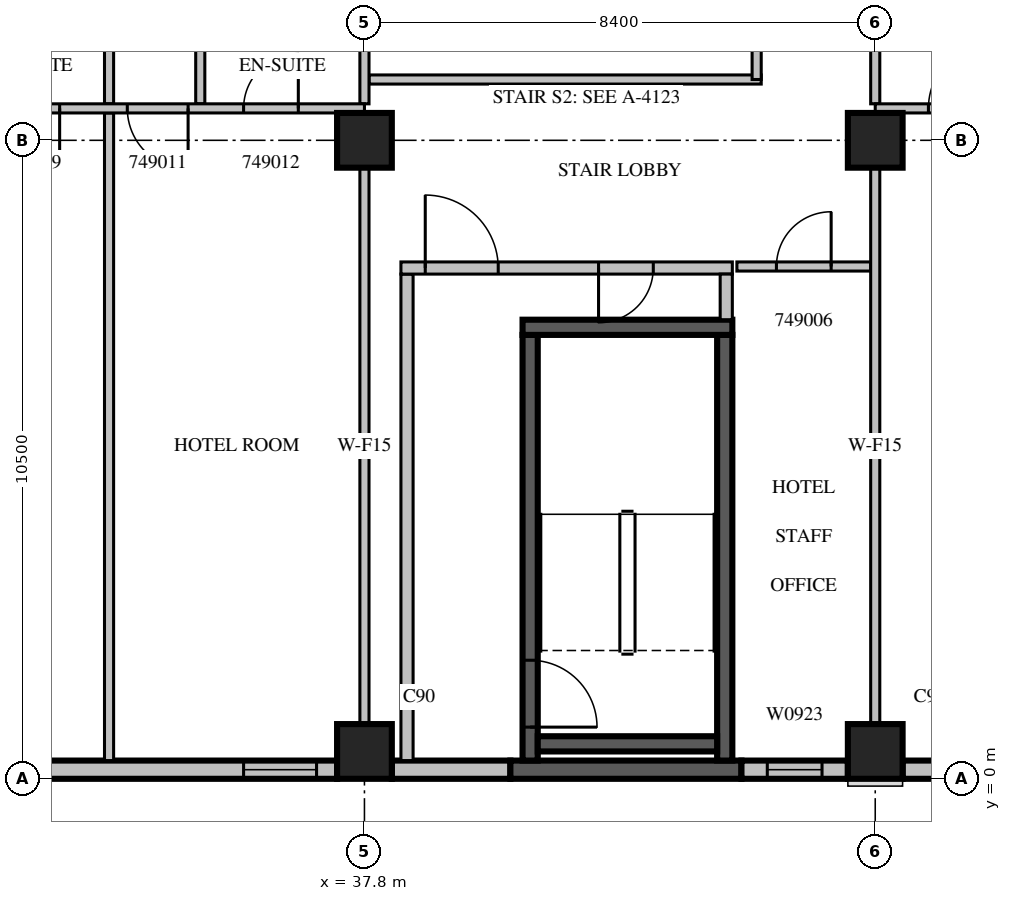
"""IFC4 building model, lengths in metres.
Left out: names, types, materials, properties, quantities, classifications, styles, units other than length and angle.
Written with IfcOpenShell. Run it as: python <this file> out.ifc"""

import sys

from ifc_helpers import new_model, si_unit, direction, frame, frame_2d, origin, origin_2d, place, context, subcontext, project, spatial, rectangle, extrude, source, transform, mapped, element, fill, save


model = new_model("IFC4")
c1 = context("Model", 3, precision=1e-05, world=origin(), true_north=direction((0.0, 1.0)))
c2 = subcontext(c1, "Body", "Model", "MODEL_VIEW")
j1 = project(units=[si_unit("LENGTHUNIT", "METRE"), si_unit("PLANEANGLEUNIT", "RADIAN")], contexts=[c1])
p1 = place(None, origin())
s1 = spatial("IfcSite", under=j1, at=p1, CompositionType="ELEMENT")
p2 = place(p1, origin())
s2 = spatial("IfcBuilding", under=s1, at=p2, CompositionType="ELEMENT")
p3 = place(p2, frame((0.0, 0.0, 219.6)))
s3 = spatial("IfcBuildingStorey", under=s2, at=p3, CompositionType="ELEMENT", Elevation=219.6)
m1 = source(origin(), c2, "Body", "SweptSolid", [
    extrude(rectangle(XDim=0.9, YDim=0.9, at=origin_2d()), origin(), (0.0, 0.0, 1.0), 3.8),
])
for number, where, z_axis, x_axis in (
    (1, (37.8, 0.45, 0.0), (0.0, 0.0, 1.0), (1.0, 0.0, 0.0)),
    (2, (46.2, 0.45, 0.0), (0.0, 0.0, 1.0), (1.0, 0.0, 0.0)),
    (3, (37.8, 10.5, 0.0), (0.0, 0.0, 1.0), (1.0, 0.0, 0.0)),
    (4, (46.2, 10.5, 0.0), (0.0, 0.0, 1.0), (1.0, 0.0, 0.0)),
):
    element("IfcColumn", number, at=place(p3, frame(where, z_axis=z_axis, x_axis=x_axis)), inside=s3, PredefinedType="COLUMN", context=c2, shape_type="MappedRepresentation", body=[
        mapped(m1, transform((0.0, 0.0, 0.0), scale=1.0)),
    ])
m2 = source(origin(), c2, "Body", "SweptSolid", [
    extrude(rectangle(XDim=7.5, YDim=0.3, at=frame_2d((3.75, 0.0))), origin(), (0.0, 0.0, 1.0), 3.4),
])
p4 = place(p3, frame((29.85, 0.15, 0.0), z_axis=(0.0, 0.0, 1.0), x_axis=(1.0, 0.0, 0.0)))
e5 = element("IfcWall", 5, at=p4, inside=s3, PredefinedType="STANDARD", context=c2, shape_type="MappedRepresentation", body=[
    mapped(m2, transform((0.0, 0.0, 0.0), scale=1.0)),
])
m3 = source(origin(), c2, "Body", "SweptSolid", [
    extrude(rectangle(XDim=1.2, YDim=2.3, at=frame_2d((0.6, 1.15))), frame((0.0, 0.16, 0.0), z_axis=(0.0, -1.0, 0.0), x_axis=(1.0, 0.0, 0.0)), (0.0, 0.0, 1.0), 0.32),
])
p5 = place(p4, frame((0.438, 0.0, 0.6)))
e6 = element("IfcOpeningElement", 6, at=p5, cuts=e5, PredefinedType="OPENING", context=c2, shape_type="MappedRepresentation", body=[
    mapped(m3, transform((0.0, 0.0, 0.0), scale=1.0)),
])
p6 = place(p4, frame((5.963, 0.0, 0.6)))
e7 = element("IfcOpeningElement", 7, at=p6, cuts=e5, PredefinedType="OPENING", context=c2, shape_type="MappedRepresentation", body=[
    mapped(m3, transform((0.0, 0.0, 0.0), scale=1.0)),
])
m4 = source(origin(), c2, "Body", "SweptSolid", [
    extrude(rectangle(XDim=1.95, YDim=0.3, at=frame_2d((0.975, 0.0))), origin(), (0.0, 0.0, 1.0), 3.4),
])
p7 = place(p3, frame((38.25, 0.15, 0.0), z_axis=(0.0, 0.0, 1.0), x_axis=(1.0, 0.0, 0.0)))
e8 = element("IfcWall", 8, at=p7, inside=s3, PredefinedType="STANDARD", context=c2, shape_type="MappedRepresentation", body=[
    mapped(m4, transform((0.0, 0.0, 0.0), scale=1.0)),
])
m5 = source(origin(), c2, "Body", "SweptSolid", [
    extrude(rectangle(XDim=3.8, YDim=0.3, at=frame_2d((1.9, 0.0))), origin(), (0.0, 0.0, 1.0), 3.4),
])
p8 = place(p3, frame((40.2, 0.15, 0.0), z_axis=(0.0, 0.0, 1.0), x_axis=(1.0, 0.0, 0.0)))
e9 = element("IfcWall", 9, at=p8, inside=s3, PredefinedType="SOLIDWALL", context=c2, shape_type="MappedRepresentation", body=[
    mapped(m5, transform((0.0, 0.0, 0.0), scale=1.0)),
])
m6 = source(origin(), c2, "Body", "SweptSolid", [
    extrude(rectangle(XDim=1.75, YDim=0.3, at=frame_2d((0.875, 0.0))), origin(), (0.0, 0.0, 1.0), 3.4),
])
p9 = place(p3, frame((44.0, 0.15, 0.0), z_axis=(0.0, 0.0, 1.0), x_axis=(1.0, 0.0, 0.0)))
e10 = element("IfcWall", 10, at=p9, inside=s3, PredefinedType="STANDARD", context=c2, shape_type="MappedRepresentation", body=[
    mapped(m6, transform((0.0, 0.0, 0.0), scale=1.0)),
])
m7 = source(origin(), c2, "Body", "SweptSolid", [
    extrude(rectangle(XDim=0.9, YDim=2.3, at=frame_2d((0.45, 1.15))), frame((0.0, 0.16, 0.0), z_axis=(0.0, -1.0, 0.0), x_axis=(1.0, 0.0, 0.0)), (0.0, 0.0, 1.0), 0.32),
])
p10 = place(p9, frame((0.425, 0.0, 0.6)))
e11 = element("IfcOpeningElement", 11, at=p10, cuts=e10, PredefinedType="OPENING", context=c2, shape_type="MappedRepresentation", body=[
    mapped(m7, transform((0.0, 0.0, 0.0), scale=1.0)),
])
m8 = source(origin(), c2, "Body", "SweptSolid", [
    extrude(rectangle(XDim=4.98, YDim=0.3, at=frame_2d((2.49, 0.0))), origin(), (0.0, 0.0, 1.0), 2.9),
])
p11 = place(p3, frame((46.65, 0.15, 0.0), z_axis=(0.0, 0.0, 1.0), x_axis=(1.0, 0.0, 0.0)))
e12 = element("IfcWall", 12, at=p11, inside=s3, PredefinedType="STANDARD", context=c2, shape_type="MappedRepresentation", body=[
    mapped(m8, transform((0.0, 0.0, 0.0), scale=1.0)),
])
m9 = source(origin(), c2, "Body", "SweptSolid", [
    extrude(rectangle(XDim=3.6, YDim=2.3, at=frame_2d((1.8, 1.15))), frame((0.0, 0.16, 0.0), z_axis=(0.0, -1.0, 0.0), x_axis=(1.0, 0.0, 0.0)), (0.0, 0.0, 1.0), 0.32),
])
p12 = place(p11, frame((0.69, 0.0, 0.6)))
e13 = element("IfcOpeningElement", 13, at=p12, cuts=e12, PredefinedType="OPENING", context=c2, shape_type="MappedRepresentation", body=[
    mapped(m9, transform((0.0, 0.0, 0.0), scale=1.0)),
])
m10 = source(origin(), c2, "Body", "SweptSolid", [
    extrude(rectangle(XDim=7.0, YDim=0.25, at=frame_2d((3.5, 0.0))), origin(), (0.0, 0.0, 1.0), 3.4),
])
p13 = place(p3, frame((40.525, 0.3, 0.0), z_axis=(0.0, 0.0, 1.0), x_axis=(0.0, 1.0, 0.0)))
e14 = element("IfcWall", 14, at=p13, inside=s3, PredefinedType="SOLIDWALL", context=c2, shape_type="MappedRepresentation", body=[
    mapped(m10, transform((0.0, 0.0, 0.0), scale=1.0)),
])
m11 = source(origin(), c2, "Body", "SweptSolid", [
    extrude(rectangle(XDim=1.1, YDim=2.1, at=frame_2d((0.55, 1.05))), frame((0.0, 0.135, 0.0), z_axis=(0.0, -1.0, 0.0), x_axis=(1.0, 0.0, 0.0)), (0.0, 0.0, 1.0), 0.27),
])
p14 = place(p13, frame((0.55, 0.0, 0.0)))
e15 = element("IfcOpeningElement", 15, at=p14, cuts=e14, PredefinedType="OPENING", context=c2, shape_type="MappedRepresentation", body=[
    mapped(m11, transform((0.0, 0.0, 0.0), scale=1.0)),
])
p15 = place(p3, frame((43.725, 0.3, 0.0), z_axis=(0.0, 0.0, 1.0), x_axis=(0.0, 1.0, 0.0)))
e16 = element("IfcWall", 16, at=p15, inside=s3, PredefinedType="SOLIDWALL", context=c2, shape_type="MappedRepresentation", body=[
    mapped(m10, transform((0.0, 0.0, 0.0), scale=1.0)),
])
m12 = source(origin(), c2, "Body", "SweptSolid", [
    extrude(rectangle(XDim=3.45, YDim=0.25, at=frame_2d((1.725, 0.0))), origin(), (0.0, 0.0, 1.0), 3.4),
])
p16 = place(p3, frame((40.4, 7.425, 0.0), z_axis=(0.0, 0.0, 1.0), x_axis=(1.0, 0.0, 0.0)))
e17 = element("IfcWall", 17, at=p16, inside=s3, PredefinedType="SOLIDWALL", context=c2, shape_type="MappedRepresentation", body=[
    mapped(m12, transform((0.0, 0.0, 0.0), scale=1.0)),
])
m13 = source(origin(), c2, "Body", "SweptSolid", [
    extrude(rectangle(XDim=2.95, YDim=0.25, at=frame_2d((1.475, 0.0))), origin(), (0.0, 0.0, 1.0), 3.4),
])
p17 = place(p3, frame((40.65, 0.575, 0.0), z_axis=(0.0, 0.0, 1.0), x_axis=(1.0, 0.0, 0.0)))
e18 = element("IfcWall", 18, at=p17, inside=s3, PredefinedType="SOLIDWALL", context=c2, shape_type="MappedRepresentation", body=[
    mapped(m13, transform((0.0, 0.0, 0.0), scale=1.0)),
])
m14 = source(origin(), c2, "Body", "SweptSolid", [
    extrude(rectangle(XDim=8.0, YDim=0.2, at=frame_2d((4.0, 0.0))), origin(), (0.0, 0.0, 1.0), 3.4),
])
p18 = place(p3, frame((38.5, 0.3, 0.0), z_axis=(0.0, 0.0, 1.0), x_axis=(0.0, 1.0, 0.0)))
e19 = element("IfcWall", 19, at=p18, inside=s3, PredefinedType="PARTITIONING", context=c2, shape_type="MappedRepresentation", body=[
    mapped(m14, transform((0.0, 0.0, 0.0), scale=1.0)),
])
m15 = source(origin(), c2, "Body", "SweptSolid", [
    extrude(rectangle(XDim=5.45, YDim=0.2, at=frame_2d((2.725, 0.0))), origin(), (0.0, 0.0, 1.0), 3.4),
])
p19 = place(p3, frame((38.4, 8.4, 0.0), z_axis=(0.0, 0.0, 1.0), x_axis=(1.0, 0.0, 0.0)))
e20 = element("IfcWall", 20, at=p19, inside=s3, PredefinedType="PARTITIONING", context=c2, shape_type="MappedRepresentation", body=[
    mapped(m15, transform((0.0, 0.0, 0.0), scale=1.0)),
])
m16 = source(origin(), c2, "Body", "SweptSolid", [
    extrude(rectangle(XDim=1.2, YDim=2.1, at=frame_2d((0.6, 1.05))), frame((0.0, 0.11, 0.0), z_axis=(0.0, -1.0, 0.0), x_axis=(1.0, 0.0, 0.0)), (0.0, 0.0, 1.0), 0.22),
])
p20 = place(p19, frame((0.4, 0.0, 0.0)))
e21 = element("IfcOpeningElement", 21, at=p20, cuts=e20, PredefinedType="OPENING", context=c2, shape_type="MappedRepresentation", body=[
    mapped(m16, transform((0.0, 0.0, 0.0), scale=1.0)),
])
m17 = source(origin(), c2, "Body", "SweptSolid", [
    extrude(rectangle(XDim=0.9, YDim=2.1, at=frame_2d((0.45, 1.05))), frame((0.0, 0.11, 0.0), z_axis=(0.0, -1.0, 0.0), x_axis=(1.0, 0.0, 0.0)), (0.0, 0.0, 1.0), 0.22),
])
p21 = place(p19, frame((3.25, 0.0, 0.0)))
e22 = element("IfcOpeningElement", 22, at=p21, cuts=e20, PredefinedType="OPENING", context=c2, shape_type="MappedRepresentation", body=[
    mapped(m17, transform((0.0, 0.0, 0.0), scale=1.0)),
])
m18 = source(origin(), c2, "Body", "SweptSolid", [
    extrude(rectangle(XDim=0.75, YDim=0.2, at=frame_2d((0.375, 0.0))), origin(), (0.0, 0.0, 1.0), 3.4),
])
p22 = place(p3, frame((43.75, 7.55, 0.0), z_axis=(0.0, 0.0, 1.0), x_axis=(0.0, 1.0, 0.0)))
e23 = element("IfcWall", 23, at=p22, inside=s3, PredefinedType="PARTITIONING", context=c2, shape_type="MappedRepresentation", body=[
    mapped(m18, transform((0.0, 0.0, 0.0), scale=1.0)),
])
m19 = source(origin(), c2, "Body", "SweptSolid", [
    extrude(rectangle(XDim=6.45, YDim=0.15, at=frame_2d((3.225, 0.0))), origin(), (0.0, 0.0, 1.0), 3.4),
])
p23 = place(p3, frame((37.875, 11.5, 0.0), z_axis=(0.0, 0.0, 1.0), x_axis=(1.0, 0.0, 0.0)))
e24 = element("IfcWall", 24, at=p23, inside=s3, PredefinedType="PARTITIONING", context=c2, shape_type="MappedRepresentation", body=[
    mapped(m19, transform((0.0, 0.0, 0.0), scale=1.0)),
])
m20 = source(origin(), c2, "Body", "SweptSolid", [
    extrude(rectangle(XDim=3.275, YDim=0.15, at=frame_2d((1.637, 0.0))), origin(), (0.0, 0.0, 1.0), 3.4),
])
p24 = place(p3, frame((44.25, 11.5, 0.0), z_axis=(0.0, 0.0, 1.0), x_axis=(0.0, 1.0, 0.0)))
e25 = element("IfcWall", 25, at=p24, inside=s3, PredefinedType="PARTITIONING", context=c2, shape_type="MappedRepresentation", body=[
    mapped(m20, transform((0.0, 0.0, 0.0), scale=1.0)),
])
m21 = source(origin(), c2, "Body", "SweptSolid", [
    extrude(rectangle(XDim=2.2, YDim=0.15, at=frame_2d((1.1, 0.0))), origin(), (0.0, 0.0, 1.0), 3.4),
])
p25 = place(p3, frame((46.125, 8.425, 0.0), z_axis=(0.0, 0.0, 1.0), x_axis=(-1.0, 0.0, 0.0)))
e26 = element("IfcWall", 26, at=p25, inside=s3, PredefinedType="PARTITIONING", context=c2, shape_type="MappedRepresentation", body=[
    mapped(m21, transform((0.0, 0.0, 0.0), scale=1.0)),
])
m22 = source(origin(), c2, "Body", "SweptSolid", [
    extrude(rectangle(XDim=0.9, YDim=2.1, at=frame_2d((0.45, 1.05))), frame((0.0, 0.085, 0.0), z_axis=(0.0, -1.0, 0.0), x_axis=(1.0, 0.0, 0.0)), (0.0, 0.0, 1.0), 0.17),
])
p26 = place(p25, frame((0.65, 0.0, 0.0)))
e27 = element("IfcOpeningElement", 27, at=p26, cuts=e26, PredefinedType="OPENING", context=c2, shape_type="MappedRepresentation", body=[
    mapped(m22, transform((0.0, 0.0, 0.0), scale=1.0)),
])
m23 = source(origin(), c2, "Body", "SweptSolid", [
    extrude(rectangle(XDim=10.65, YDim=0.15, at=frame_2d((5.325, 0.0))), origin(), (0.0, 0.0, 1.0), 3.4),
])
p27 = place(p3, frame((33.6, 0.3, 0.0), z_axis=(0.0, 0.0, 1.0), x_axis=(0.0, 1.0, 0.0)))
e28 = element("IfcWall", 28, at=p27, inside=s3, PredefinedType="PARTITIONING", context=c2, shape_type="MappedRepresentation", body=[
    mapped(m23, transform((0.0, 0.0, 0.0), scale=1.0)),
])
m24 = source(origin(), c2, "Body", "SweptSolid", [
    extrude(rectangle(XDim=3.6, YDim=0.15, at=frame_2d((1.8, 0.0))), origin(), (0.0, 0.0, 1.0), 3.4),
])
for number, where, z_axis, x_axis in (
    (29, (33.6, 11.1, 0.0), (0.0, 0.0, 1.0), (0.0, 1.0, 0.0)),
    (30, (35.1, 11.1, 0.0), (0.0, 0.0, 1.0), (0.0, 1.0, 0.0)),
):
    element("IfcWall", number, at=place(p3, frame(where, z_axis=z_axis, x_axis=x_axis)), inside=s3, PredefinedType="PARTITIONING", context=c2, shape_type="MappedRepresentation", body=[
        mapped(m24, transform((0.0, 0.0, 0.0), scale=1.0)),
    ])
m25 = source(origin(), c2, "Body", "SweptSolid", [
    extrude(rectangle(XDim=9.152, YDim=0.15, at=frame_2d((4.576, 0.0))), origin(), (0.0, 0.0, 1.0), 3.4),
])
p28 = place(p3, frame((37.8, 0.899, 0.0), z_axis=(0.0, 0.0, 1.0), x_axis=(0.0, 1.0, 0.0)))
e31 = element("IfcWall", 31, at=p28, inside=s3, PredefinedType="PARTITIONING", context=c2, shape_type="MappedRepresentation", body=[
    mapped(m25, transform((0.0, 0.0, 0.0), scale=1.0)),
])
p29 = place(p3, frame((37.8, 11.1, 0.0), z_axis=(0.0, 0.0, 1.0), x_axis=(0.0, 1.0, 0.0)))
e32 = element("IfcWall", 32, at=p29, inside=s3, PredefinedType="PARTITIONING", context=c2, shape_type="MappedRepresentation", body=[
    mapped(m24, transform((0.0, 0.0, 0.0), scale=1.0)),
])
m26 = source(origin(), c2, "Body", "SweptSolid", [
    extrude(rectangle(XDim=8.4, YDim=0.15, at=frame_2d((4.2, 0.0))), origin(), (0.0, 0.0, 1.0), 3.4),
])
p30 = place(p3, frame((37.8, 11.025, 0.0), z_axis=(0.0, 0.0, 1.0), x_axis=(-1.0, 0.0, 0.0)))
e33 = element("IfcWall", 33, at=p30, inside=s3, PredefinedType="PARTITIONING", context=c2, shape_type="MappedRepresentation", body=[
    mapped(m26, transform((0.0, 0.0, 0.0), scale=1.0)),
])
p31 = place(p30, frame((7.025, 0.0, 0.0)))
e34 = element("IfcOpeningElement", 34, at=p31, cuts=e33, PredefinedType="OPENING", context=c2, shape_type="MappedRepresentation", body=[
    mapped(m22, transform((0.0, 0.0, 0.0), scale=1.0)),
])
p32 = place(p30, frame((5.013, 0.0, 0.0)))
e35 = element("IfcOpeningElement", 35, at=p32, cuts=e33, PredefinedType="OPENING", context=c2, shape_type="MappedRepresentation", body=[
    mapped(m22, transform((0.0, 0.0, 0.0), scale=1.0)),
])
m27 = source(origin(), c2, "Body", "SweptSolid", [
    extrude(rectangle(XDim=1.0, YDim=2.1, at=frame_2d((0.5, 1.05))), frame((0.0, 0.085, 0.0), z_axis=(0.0, -1.0, 0.0), x_axis=(1.0, 0.0, 0.0)), (0.0, 0.0, 1.0), 0.17),
])
p33 = place(p30, frame((2.9, 0.0, 0.0)))
e36 = element("IfcOpeningElement", 36, at=p33, cuts=e33, PredefinedType="OPENING", context=c2, shape_type="MappedRepresentation", body=[
    mapped(m27, transform((0.0, 0.0, 0.0), scale=1.0)),
])
p34 = place(p30, frame((1.087, 0.0, 0.0)))
e37 = element("IfcOpeningElement", 37, at=p34, cuts=e33, PredefinedType="OPENING", context=c2, shape_type="MappedRepresentation", body=[
    mapped(m22, transform((0.0, 0.0, 0.0), scale=1.0)),
])
p35 = place(p3, frame((46.2, 0.899, 0.0), z_axis=(0.0, 0.0, 1.0), x_axis=(0.0, 1.0, 0.0)))
e38 = element("IfcWall", 38, at=p35, inside=s3, PredefinedType="PARTITIONING", context=c2, shape_type="MappedRepresentation", body=[
    mapped(m25, transform((0.0, 0.0, 0.0), scale=1.0)),
])
p36 = place(p3, frame((46.2, 11.1, 0.0), z_axis=(0.0, 0.0, 1.0), x_axis=(0.0, 1.0, 0.0)))
e39 = element("IfcWall", 39, at=p36, inside=s3, PredefinedType="PARTITIONING", context=c2, shape_type="MappedRepresentation", body=[
    mapped(m24, transform((0.0, 0.0, 0.0), scale=1.0)),
])
m28 = source(origin(), c2, "Body", "SweptSolid", [
    extrude(rectangle(XDim=7.355, YDim=0.15, at=frame_2d((3.678, 0.0))), origin(), (0.0, 0.0, 1.0), 3.4),
])
p37 = place(p3, frame((53.555, 11.025, 0.0), z_axis=(0.0, 0.0, 1.0), x_axis=(-1.0, 0.0, 0.0)))
e40 = element("IfcWall", 40, at=p37, inside=s3, PredefinedType="PARTITIONING", context=c2, shape_type="MappedRepresentation", body=[
    mapped(m28, transform((0.0, 0.0, 0.0), scale=1.0)),
])
m29 = source(origin(), c2, "Body", "SweptSolid", [
    extrude(rectangle(XDim=1.1, YDim=2.1, at=frame_2d((0.55, 1.05))), frame((0.0, 0.085, 0.0), z_axis=(0.0, -1.0, 0.0), x_axis=(1.0, 0.0, 0.0)), (0.0, 0.0, 1.0), 0.17),
])
p38 = place(p37, frame((5.38, 0.0, 0.0)))
e41 = element("IfcOpeningElement", 41, at=p38, cuts=e40, PredefinedType="OPENING", context=c2, shape_type="MappedRepresentation", body=[
    mapped(m29, transform((0.0, 0.0, 0.0), scale=1.0)),
])
p39 = place(p37, frame((3.106, 0.0, 0.0)))
e42 = element("IfcOpeningElement", 42, at=p39, cuts=e40, PredefinedType="OPENING", context=c2, shape_type="MappedRepresentation", body=[
    mapped(m22, transform((0.0, 0.0, 0.0), scale=1.0)),
])
m30 = source(origin(), c2, "Body", "SweptSolid", [
    extrude(rectangle(XDim=1.2, YDim=2.3, at=frame_2d((0.6, 1.15))), frame((0.0, 0.03, 0.0), z_axis=(0.0, -1.0, 0.0), x_axis=(1.0, 0.0, 0.0)), (0.0, 0.0, 1.0), 0.06),
])
p40 = place(p6, origin())
e43 = element("IfcWindow", 43, at=p40, inside=s3, PartitioningType="SINGLE_PANEL", PredefinedType="WINDOW", context=c2, shape_type="MappedRepresentation", body=[
    mapped(m30, transform((0.0, 0.0, 0.0), scale=1.0)),
])
fill(e7, e43)
m31 = source(origin(), c2, "Body", "SweptSolid", [
    extrude(rectangle(XDim=0.9, YDim=2.3, at=frame_2d((0.45, 1.15))), frame((0.0, 0.03, 0.0), z_axis=(0.0, -1.0, 0.0), x_axis=(1.0, 0.0, 0.0)), (0.0, 0.0, 1.0), 0.06),
])
p41 = place(p10, origin())
e44 = element("IfcWindow", 44, at=p41, inside=s3, PartitioningType="SINGLE_PANEL", PredefinedType="WINDOW", context=c2, shape_type="MappedRepresentation", body=[
    mapped(m31, transform((0.0, 0.0, 0.0), scale=1.0)),
])
fill(e11, e44)
m32 = source(origin(), c2, "Body", "SweptSolid", [
    extrude(rectangle(XDim=1.1, YDim=2.1, at=frame_2d((0.55, 1.05))), frame((0.0, 0.025, 0.0), z_axis=(0.0, -1.0, 0.0), x_axis=(1.0, 0.0, 0.0)), (0.0, 0.0, 1.0), 0.05),
])
p42 = place(p14, origin())
e45 = element("IfcDoor", 45, at=p42, inside=s3, OperationType="SINGLE_SWING_RIGHT", PredefinedType="DOOR", context=c2, shape_type="MappedRepresentation", body=[
    mapped(m32, transform((0.0, 0.0, 0.0), scale=1.0)),
])
fill(e15, e45)
m33 = source(origin(), c2, "Body", "SweptSolid", [
    extrude(rectangle(XDim=1.2, YDim=2.1, at=frame_2d((0.6, 1.05))), frame((0.0, 0.025, 0.0), z_axis=(0.0, -1.0, 0.0), x_axis=(1.0, 0.0, 0.0)), (0.0, 0.0, 1.0), 0.05),
])
p43 = place(p20, origin())
e46 = element("IfcDoor", 46, at=p43, inside=s3, OperationType="SINGLE_SWING_LEFT", PredefinedType="DOOR", context=c2, shape_type="MappedRepresentation", body=[
    mapped(m33, transform((0.0, 0.0, 0.0), scale=1.0)),
])
fill(e21, e46)
m34 = source(origin(), c2, "Body", "SweptSolid", [
    extrude(rectangle(XDim=0.9, YDim=2.1, at=frame_2d((0.45, 1.05))), frame((0.0, 0.025, 0.0), z_axis=(0.0, -1.0, 0.0), x_axis=(1.0, 0.0, 0.0)), (0.0, 0.0, 1.0), 0.05),
])
p44 = place(p21, origin())
e47 = element("IfcDoor", 47, at=p44, inside=s3, OperationType="SINGLE_SWING_RIGHT", PredefinedType="DOOR", context=c2, shape_type="MappedRepresentation", body=[
    mapped(m34, transform((0.0, 0.0, 0.0), scale=1.0)),
])
fill(e22, e47)
p45 = place(p26, origin())
e48 = element("IfcDoor", 48, at=p45, inside=s3, OperationType="SINGLE_SWING_RIGHT", PredefinedType="DOOR", context=c2, shape_type="MappedRepresentation", body=[
    mapped(m34, transform((0.0, 0.0, 0.0), scale=1.0)),
])
fill(e27, e48)
p46 = place(p32, origin())
e49 = element("IfcDoor", 49, at=p46, inside=s3, OperationType="SINGLE_SWING_LEFT", PredefinedType="DOOR", context=c2, shape_type="MappedRepresentation", body=[
    mapped(m34, transform((0.0, 0.0, 0.0), scale=1.0)),
])
fill(e35, e49)
m35 = source(origin(), c2, "Body", "SweptSolid", [
    extrude(rectangle(XDim=1.0, YDim=2.1, at=frame_2d((0.5, 1.05))), frame((0.0, 0.025, 0.0), z_axis=(0.0, -1.0, 0.0), x_axis=(1.0, 0.0, 0.0)), (0.0, 0.0, 1.0), 0.05),
])
p47 = place(p33, origin())
e50 = element("IfcDoor", 50, at=p47, inside=s3, OperationType="SINGLE_SWING_LEFT", PredefinedType="DOOR", context=c2, shape_type="MappedRepresentation", body=[
    mapped(m35, transform((0.0, 0.0, 0.0), scale=1.0)),
])
fill(e36, e50)
p48 = place(p34, origin())
e51 = element("IfcDoor", 51, at=p48, inside=s3, OperationType="SINGLE_SWING_RIGHT", PredefinedType="DOOR", context=c2, shape_type="MappedRepresentation", body=[
    mapped(m34, transform((0.0, 0.0, 0.0), scale=1.0)),
])
fill(e37, e51)
p49 = place(p38, origin())
e52 = element("IfcDoor", 52, at=p49, inside=s3, OperationType="SINGLE_SWING_RIGHT", PredefinedType="DOOR", context=c2, shape_type="MappedRepresentation", body=[
    mapped(m32, transform((0.0, 0.0, 0.0), scale=1.0)),
])
fill(e41, e52)
save(model, sys.argv[1])
